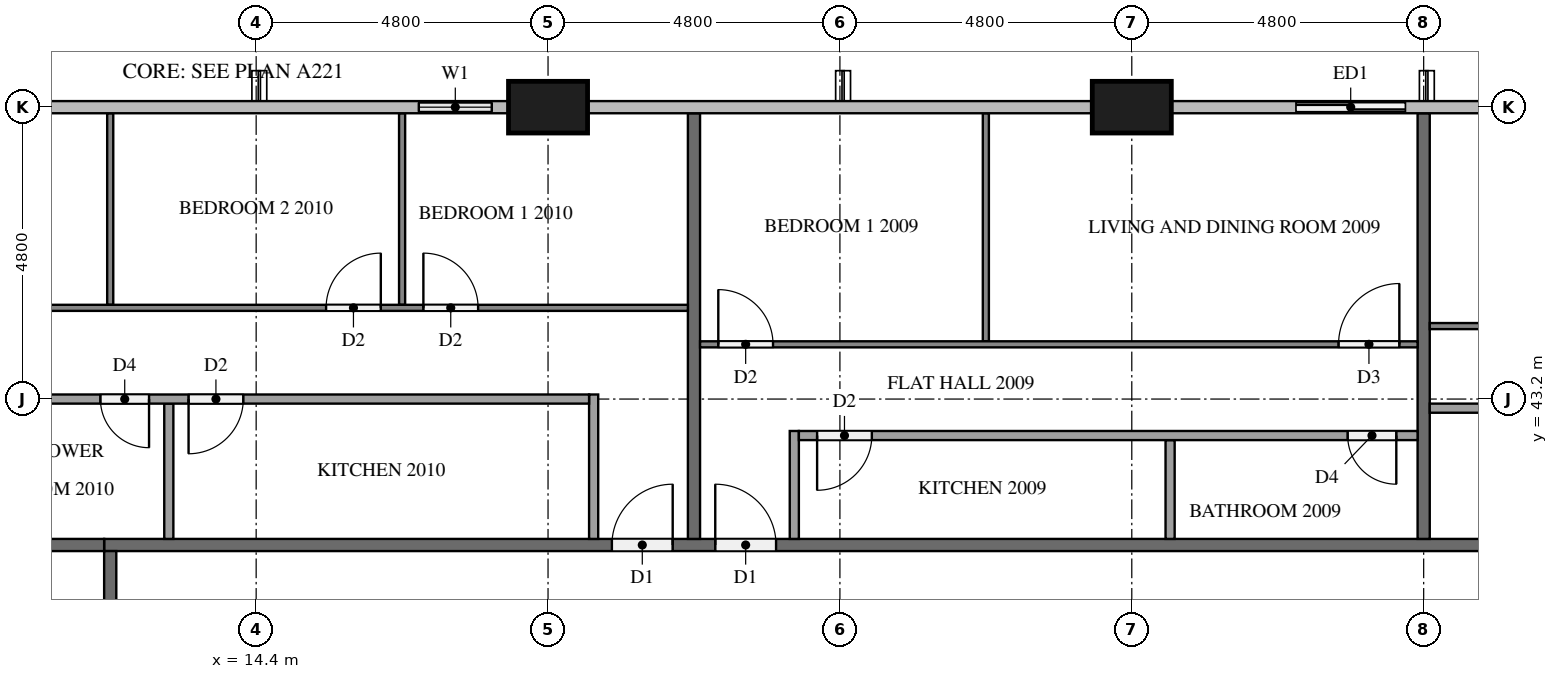
"""IFC4 building model, lengths in metres.
Left out: names, types, materials, properties, quantities, classifications, styles, units other than length and angle.
Written with IfcOpenShell. Run it as: python <this file> out.ifc"""

import sys

from ifc_helpers import new_model, si_unit, direction, frame, frame_2d, origin, origin_2d, place, context, subcontext, project, spatial, rectangle, extrude, element, fill, save


model = new_model("IFC4")
c1 = context("Model", 3, precision=1e-05, world=origin(), true_north=direction((0.0, 1.0)))
c2 = subcontext(c1, "Body", "Model", "MODEL_VIEW")
j1 = project(units=[si_unit("LENGTHUNIT", "METRE"), si_unit("PLANEANGLEUNIT", "RADIAN")], contexts=[c1])
p1 = place(None, origin())
s1 = spatial("IfcSite", under=j1, at=p1, CompositionType="ELEMENT")
p2 = place(p1, origin())
s2 = spatial("IfcBuilding", under=s1, at=p2, CompositionType="ELEMENT")
p3 = place(p2, frame((0.0, 0.0, 80.3)))
s3 = spatial("IfcBuildingStorey", under=s2, at=p3, CompositionType="ELEMENT", Elevation=80.3)
for number, where, z_axis, x_axis in (
    (1, (28.8, 48.0, 0.0), (0.0, 0.0, 1.0), (1.0, 0.0, 0.0)),
    (2, (19.2, 48.0, 0.0), (0.0, 0.0, 1.0), (1.0, 0.0, 0.0)),
):
    element("IfcColumn", number, at=place(p3, frame(where, z_axis=z_axis, x_axis=x_axis)), inside=s3, PredefinedType="COLUMN", context=c2, shape_type="SweptSolid", body=[
        extrude(rectangle(XDim=1.3, YDim=0.85, at=origin_2d()), origin(), (0.0, 0.0, 1.0), 3.1),
    ])
p4 = place(p3, frame((33.6, 48.0, 0.0), z_axis=(0.0, 0.0, 1.0), x_axis=(-1.0, 0.0, 0.0)))
e3 = element("IfcWall", 3, at=p4, inside=s3, PredefinedType="SOLIDWALL", context=c2, shape_type="SweptSolid", body=[
    extrude(rectangle(XDim=2.4, YDim=0.15, at=frame_2d((1.2, 0.0))), origin(), (0.0, 0.0, 1.0), 3.1),
])
p5 = place(p4, frame((0.3, 0.0, 0.0)))
e4 = element("IfcOpeningElement", 4, at=p5, cuts=e3, PredefinedType="OPENING", context=c2, shape_type="SweptSolid", body=[
    extrude(rectangle(XDim=1.8, YDim=2.4, at=frame_2d((0.9, 1.2))), frame((0.0, 0.085, 0.0), z_axis=(0.0, -1.0, 0.0), x_axis=(1.0, 0.0, 0.0)), (0.0, 0.0, 1.0), 0.17),
])
p6 = place(p3, frame((18.55, 48.0, 0.0), z_axis=(0.0, 0.0, 1.0), x_axis=(-1.0, 0.0, 0.0)))
e5 = element("IfcWall", 5, at=p6, inside=s3, PredefinedType="SOLIDWALL", context=c2, shape_type="SweptSolid", body=[
    extrude(rectangle(XDim=1.75, YDim=0.15, at=frame_2d((0.875, 0.0))), origin(), (0.0, 0.0, 1.0), 3.1),
])
p7 = place(p6, frame((0.275, 0.0, 0.9)))
e6 = element("IfcOpeningElement", 6, at=p7, cuts=e5, PredefinedType="OPENING", context=c2, shape_type="SweptSolid", body=[
    extrude(rectangle(XDim=1.2, YDim=1.4, at=frame_2d((0.6, 0.7))), frame((0.0, 0.085, 0.0), z_axis=(0.0, -1.0, 0.0), x_axis=(1.0, 0.0, 0.0)), (0.0, 0.0, 1.0), 0.17),
])
p8 = place(p3, frame((11.9, 40.8, 0.0), z_axis=(0.0, 0.0, 1.0), x_axis=(1.0, 0.0, 0.0)))
e7 = element("IfcWall", 7, at=p8, inside=s3, PredefinedType="PARTITIONING", context=c2, shape_type="SweptSolid", body=[
    extrude(rectangle(XDim=38.6, YDim=0.2, at=frame_2d((19.3, 0.0))), origin(), (0.0, 0.0, 1.0), 3.1),
])
p9 = place(p8, frame((37.15, 0.0, 0.0)))
e8 = element("IfcOpeningElement", 8, at=p9, cuts=e7, PredefinedType="OPENING", context=c2, shape_type="SweptSolid", body=[
    extrude(rectangle(XDim=1.0, YDim=2.1, at=frame_2d((0.5, 1.05))), frame((0.0, 0.11, 0.0), z_axis=(0.0, -1.0, 0.0), x_axis=(1.0, 0.0, 0.0)), (0.0, 0.0, 1.0), 0.22),
])
p10 = place(p8, frame((10.05, 0.0, 0.0)))
e9 = element("IfcOpeningElement", 9, at=p10, cuts=e7, PredefinedType="OPENING", context=c2, shape_type="SweptSolid", body=[
    extrude(rectangle(XDim=1.0, YDim=2.1, at=frame_2d((0.5, 1.05))), frame((0.0, 0.11, 0.0), z_axis=(0.0, -1.0, 0.0), x_axis=(1.0, 0.0, 0.0)), (0.0, 0.0, 1.0), 0.22),
])
p11 = place(p8, frame((8.35, 0.0, 0.0)))
e10 = element("IfcOpeningElement", 10, at=p11, cuts=e7, PredefinedType="OPENING", context=c2, shape_type="SweptSolid", body=[
    extrude(rectangle(XDim=1.0, YDim=2.1, at=frame_2d((0.5, 1.05))), frame((0.0, 0.11, 0.0), z_axis=(0.0, -1.0, 0.0), x_axis=(1.0, 0.0, 0.0)), (0.0, 0.0, 1.0), 0.22),
])
p12 = place(p3, frame((12.0, 12.1, 0.0), z_axis=(0.0, 0.0, 1.0), x_axis=(0.0, 1.0, 0.0)))
e11 = element("IfcWall", 11, at=p12, inside=s3, PredefinedType="PARTITIONING", context=c2, shape_type="SweptSolid", body=[
    extrude(rectangle(XDim=28.6, YDim=0.2, at=frame_2d((14.3, 0.0))), origin(), (0.0, 0.0, 1.0), 3.1),
])
p13 = place(p12, frame((17.05, 0.0, 0.0)))
e12 = element("IfcOpeningElement", 12, at=p13, cuts=e11, PredefinedType="OPENING", context=c2, shape_type="SweptSolid", body=[
    extrude(rectangle(XDim=1.0, YDim=2.1, at=frame_2d((0.5, 1.05))), frame((0.0, 0.11, 0.0), z_axis=(0.0, -1.0, 0.0), x_axis=(1.0, 0.0, 0.0)), (0.0, 0.0, 1.0), 0.22),
])
p14 = place(p12, frame((15.35, 0.0, 0.0)))
e13 = element("IfcOpeningElement", 13, at=p14, cuts=e11, PredefinedType="OPENING", context=c2, shape_type="SweptSolid", body=[
    extrude(rectangle(XDim=1.0, YDim=2.1, at=frame_2d((0.5, 1.05))), frame((0.0, 0.11, 0.0), z_axis=(0.0, -1.0, 0.0), x_axis=(1.0, 0.0, 0.0)), (0.0, 0.0, 1.0), 0.22),
])
p15 = place(p12, frame((8.15, 0.0, 0.0)))
e14 = element("IfcOpeningElement", 14, at=p15, cuts=e11, PredefinedType="OPENING", context=c2, shape_type="SweptSolid", body=[
    extrude(rectangle(XDim=1.0, YDim=2.1, at=frame_2d((0.5, 1.05))), frame((0.0, 0.11, 0.0), z_axis=(0.0, -1.0, 0.0), x_axis=(1.0, 0.0, 0.0)), (0.0, 0.0, 1.0), 0.22),
])
for number, where, z_axis, x_axis in (
    (15, (33.6, 47.9, 0.0), (0.0, 0.0, 1.0), (0.0, -1.0, 0.0)),
    (16, (21.6, 47.9, 0.0), (0.0, 0.0, 1.0), (0.0, -1.0, 0.0)),
    (17, (4.9, 40.8, 0.0), (0.0, 0.0, 1.0), (1.0, 0.0, 0.0)),
):
    element("IfcWall", number, at=place(p3, frame(where, z_axis=z_axis, x_axis=x_axis)), inside=s3, PredefinedType="PARTITIONING", context=c2, shape_type="SweptSolid", body=[
        extrude(rectangle(XDim=7.0, YDim=0.2, at=frame_2d((3.5, 0.0))), origin(), (0.0, 0.0, 1.0), 3.1),
    ])
p16 = place(p3, frame((33.7, 44.4, 0.0), z_axis=(0.0, 0.0, 1.0), x_axis=(1.0, 0.0, 0.0)))
e18 = element("IfcWall", 18, at=p16, inside=s3, PredefinedType="PARTITIONING", context=c2, shape_type="SweptSolid", body=[
    extrude(rectangle(XDim=16.6, YDim=0.1, at=frame_2d((8.3, 0.0))), origin(), (0.0, 0.0, 1.0), 3.1),
])
p17 = place(p16, frame((15.3, 0.0, 0.0)))
e19 = element("IfcOpeningElement", 19, at=p17, cuts=e18, PredefinedType="OPENING", context=c2, shape_type="SweptSolid", body=[
    extrude(rectangle(XDim=1.0, YDim=2.1, at=frame_2d((0.5, 1.05))), frame((0.0, 0.06, 0.0), z_axis=(0.0, -1.0, 0.0), x_axis=(1.0, 0.0, 0.0)), (0.0, 0.0, 1.0), 0.12),
])
p18 = place(p16, frame((5.05, 0.0, 0.0)))
e20 = element("IfcOpeningElement", 20, at=p18, cuts=e18, PredefinedType="OPENING", context=c2, shape_type="SweptSolid", body=[
    extrude(rectangle(XDim=0.9, YDim=2.1, at=frame_2d((0.45, 1.05))), frame((0.0, 0.06, 0.0), z_axis=(0.0, -1.0, 0.0), x_axis=(1.0, 0.0, 0.0)), (0.0, 0.0, 1.0), 0.12),
])
p19 = place(p16, frame((3.45, 0.0, 0.0)))
e21 = element("IfcOpeningElement", 21, at=p19, cuts=e18, PredefinedType="OPENING", context=c2, shape_type="SweptSolid", body=[
    extrude(rectangle(XDim=0.9, YDim=2.1, at=frame_2d((0.45, 1.05))), frame((0.0, 0.06, 0.0), z_axis=(0.0, -1.0, 0.0), x_axis=(1.0, 0.0, 0.0)), (0.0, 0.0, 1.0), 0.12),
])
p20 = place(p3, frame((48.675, 43.05, 0.0), z_axis=(0.0, 0.0, 1.0), x_axis=(-1.0, 0.0, 0.0)))
e22 = element("IfcWall", 22, at=p20, inside=s3, PredefinedType="PARTITIONING", context=c2, shape_type="SweptSolid", body=[
    extrude(rectangle(XDim=14.975, YDim=0.15, at=frame_2d((7.488, 0.0))), origin(), (0.0, 0.0, 1.0), 3.1),
])
p21 = place(p20, frame((0.3, 0.0, 0.0)))
e23 = element("IfcOpeningElement", 23, at=p21, cuts=e22, PredefinedType="OPENING", context=c2, shape_type="SweptSolid", body=[
    extrude(rectangle(XDim=0.9, YDim=2.1, at=frame_2d((0.45, 1.05))), frame((0.0, 0.085, 0.0), z_axis=(0.0, -1.0, 0.0), x_axis=(1.0, 0.0, 0.0)), (0.0, 0.0, 1.0), 0.17),
])
p22 = place(p20, frame((9.242, 0.0, 0.0)))
e24 = element("IfcOpeningElement", 24, at=p22, cuts=e22, PredefinedType="OPENING", context=c2, shape_type="SweptSolid", body=[
    extrude(rectangle(XDim=0.8, YDim=2.1, at=frame_2d((0.4, 1.05))), frame((0.0, 0.085, 0.0), z_axis=(0.0, -1.0, 0.0), x_axis=(1.0, 0.0, 0.0)), (0.0, 0.0, 1.0), 0.17),
])
p23 = place(p20, frame((10.692, 0.0, 0.0)))
e25 = element("IfcOpeningElement", 25, at=p23, cuts=e22, PredefinedType="OPENING", context=c2, shape_type="SweptSolid", body=[
    extrude(rectangle(XDim=0.9, YDim=2.1, at=frame_2d((0.45, 1.05))), frame((0.0, 0.085, 0.0), z_axis=(0.0, -1.0, 0.0), x_axis=(1.0, 0.0, 0.0)), (0.0, 0.0, 1.0), 0.17),
])
p24 = place(p3, frame((26.4, 44.15, 0.0), z_axis=(0.0, 0.0, 1.0), x_axis=(0.0, 1.0, 0.0)))
e26 = element("IfcWall", 26, at=p24, inside=s3, PredefinedType="PARTITIONING", context=c2, shape_type="SweptSolid", body=[
    extrude(rectangle(XDim=3.75, YDim=0.1, at=frame_2d((1.875, 0.0))), origin(), (0.0, 0.0, 1.0), 3.1),
])
p25 = place(p3, frame((21.7, 44.1, 0.0), z_axis=(0.0, 0.0, 1.0), x_axis=(1.0, 0.0, 0.0)))
e27 = element("IfcWall", 27, at=p25, inside=s3, PredefinedType="PARTITIONING", context=c2, shape_type="SweptSolid", body=[
    extrude(rectangle(XDim=11.8, YDim=0.1, at=frame_2d((5.9, 0.0))), origin(), (0.0, 0.0, 1.0), 3.1),
])
p26 = place(p25, frame((0.3, 0.0, 0.0)))
e28 = element("IfcOpeningElement", 28, at=p26, cuts=e27, PredefinedType="OPENING", context=c2, shape_type="SweptSolid", body=[
    extrude(rectangle(XDim=0.9, YDim=2.1, at=frame_2d((0.45, 1.05))), frame((0.0, 0.06, 0.0), z_axis=(0.0, -1.0, 0.0), x_axis=(1.0, 0.0, 0.0)), (0.0, 0.0, 1.0), 0.12),
])
p27 = place(p25, frame((10.5, 0.0, 0.0)))
e29 = element("IfcOpeningElement", 29, at=p27, cuts=e27, PredefinedType="OPENING", context=c2, shape_type="SweptSolid", body=[
    extrude(rectangle(XDim=1.0, YDim=2.1, at=frame_2d((0.5, 1.05))), frame((0.0, 0.06, 0.0), z_axis=(0.0, -1.0, 0.0), x_axis=(1.0, 0.0, 0.0)), (0.0, 0.0, 1.0), 0.12),
])
p28 = place(p3, frame((29.43, 40.9, 0.0), z_axis=(0.0, 0.0, 1.0), x_axis=(0.0, 1.0, 0.0)))
e30 = element("IfcWall", 30, at=p28, inside=s3, PredefinedType="PARTITIONING", context=c2, shape_type="SweptSolid", body=[
    extrude(rectangle(XDim=1.625, YDim=0.15, at=frame_2d((0.812, 0.0))), origin(), (0.0, 0.0, 1.0), 3.1),
])
p29 = place(p3, frame((23.25, 40.9, 0.0), z_axis=(0.0, 0.0, 1.0), x_axis=(0.0, 1.0, 0.0)))
e31 = element("IfcWall", 31, at=p29, inside=s3, PredefinedType="PARTITIONING", context=c2, shape_type="SweptSolid", body=[
    extrude(rectangle(XDim=1.775, YDim=0.15, at=frame_2d((0.888, 0.0))), origin(), (0.0, 0.0, 1.0), 3.1),
])
p30 = place(p3, frame((33.5, 42.6, 0.0), z_axis=(0.0, 0.0, 1.0), x_axis=(-1.0, 0.0, 0.0)))
e32 = element("IfcWall", 32, at=p30, inside=s3, PredefinedType="PARTITIONING", context=c2, shape_type="SweptSolid", body=[
    extrude(rectangle(XDim=10.175, YDim=0.15, at=frame_2d((5.087, 0.0))), origin(), (0.0, 0.0, 1.0), 3.1),
])
p31 = place(p30, frame((8.975, 0.0, 0.0)))
e33 = element("IfcOpeningElement", 33, at=p31, cuts=e32, PredefinedType="OPENING", context=c2, shape_type="SweptSolid", body=[
    extrude(rectangle(XDim=0.9, YDim=2.1, at=frame_2d((0.45, 1.05))), frame((0.0, 0.085, 0.0), z_axis=(0.0, -1.0, 0.0), x_axis=(1.0, 0.0, 0.0)), (0.0, 0.0, 1.0), 0.17),
])
p32 = place(p30, frame((0.35, 0.0, 0.0)))
e34 = element("IfcOpeningElement", 34, at=p32, cuts=e32, PredefinedType="OPENING", context=c2, shape_type="SweptSolid", body=[
    extrude(rectangle(XDim=0.8, YDim=2.1, at=frame_2d((0.4, 1.05))), frame((0.0, 0.085, 0.0), z_axis=(0.0, -1.0, 0.0), x_axis=(1.0, 0.0, 0.0)), (0.0, 0.0, 1.0), 0.17),
])
for number, where, z_axis, x_axis in (
    (35, (16.8, 44.75, 0.0), (0.0, 0.0, 1.0), (0.0, 1.0, 0.0)),
    (36, (12.0, 44.75, 0.0), (0.0, 0.0, 1.0), (0.0, 1.0, 0.0)),
):
    element("IfcWall", number, at=place(p3, frame(where, z_axis=z_axis, x_axis=x_axis)), inside=s3, PredefinedType="PARTITIONING", context=c2, shape_type="SweptSolid", body=[
        extrude(rectangle(XDim=3.15, YDim=0.1, at=frame_2d((1.575, 0.0))), origin(), (0.0, 0.0, 1.0), 3.1),
    ])
p33 = place(p3, frame((5.302, 44.7, 0.0), z_axis=(0.0, 0.0, 1.0), x_axis=(1.0, 0.0, 0.0)))
e37 = element("IfcWall", 37, at=p33, inside=s3, PredefinedType="PARTITIONING", context=c2, shape_type="SweptSolid", body=[
    extrude(rectangle(XDim=16.198, YDim=0.1, at=frame_2d((8.099, 0.0))), origin(), (0.0, 0.0, 1.0), 3.1),
])
p34 = place(p33, frame((11.848, 0.0, 0.0)))
e38 = element("IfcOpeningElement", 38, at=p34, cuts=e37, PredefinedType="OPENING", context=c2, shape_type="SweptSolid", body=[
    extrude(rectangle(XDim=0.9, YDim=2.1, at=frame_2d((0.45, 1.05))), frame((0.0, 0.06, 0.0), z_axis=(0.0, -1.0, 0.0), x_axis=(1.0, 0.0, 0.0)), (0.0, 0.0, 1.0), 0.12),
])
p35 = place(p33, frame((10.248, 0.0, 0.0)))
e39 = element("IfcOpeningElement", 39, at=p35, cuts=e37, PredefinedType="OPENING", context=c2, shape_type="SweptSolid", body=[
    extrude(rectangle(XDim=0.9, YDim=2.1, at=frame_2d((0.45, 1.05))), frame((0.0, 0.06, 0.0), z_axis=(0.0, -1.0, 0.0), x_axis=(1.0, 0.0, 0.0)), (0.0, 0.0, 1.0), 0.12),
])
p36 = place(p33, frame((0.3, 0.0, 0.0)))
e40 = element("IfcOpeningElement", 40, at=p36, cuts=e37, PredefinedType="OPENING", context=c2, shape_type="SweptSolid", body=[
    extrude(rectangle(XDim=1.0, YDim=2.1, at=frame_2d((0.5, 1.05))), frame((0.0, 0.06, 0.0), z_axis=(0.0, -1.0, 0.0), x_axis=(1.0, 0.0, 0.0)), (0.0, 0.0, 1.0), 0.12),
])
p37 = place(p3, frame((12.963, 40.9, 0.0), z_axis=(0.0, 0.0, 1.0), x_axis=(0.0, 1.0, 0.0)))
e41 = element("IfcWall", 41, at=p37, inside=s3, PredefinedType="PARTITIONING", context=c2, shape_type="SweptSolid", body=[
    extrude(rectangle(XDim=2.225, YDim=0.15, at=frame_2d((1.113, 0.0))), origin(), (0.0, 0.0, 1.0), 3.1),
])
p38 = place(p3, frame((19.95, 40.9, 0.0), z_axis=(0.0, 0.0, 1.0), x_axis=(0.0, 1.0, 0.0)))
e42 = element("IfcWall", 42, at=p38, inside=s3, PredefinedType="PARTITIONING", context=c2, shape_type="SweptSolid", body=[
    extrude(rectangle(XDim=2.375, YDim=0.15, at=frame_2d((1.188, 0.0))), origin(), (0.0, 0.0, 1.0), 3.1),
])
p39 = place(p3, frame((19.875, 43.2, 0.0), z_axis=(0.0, 0.0, 1.0), x_axis=(-1.0, 0.0, 0.0)))
e43 = element("IfcWall", 43, at=p39, inside=s3, PredefinedType="PARTITIONING", context=c2, shape_type="SweptSolid", body=[
    extrude(rectangle(XDim=14.5, YDim=0.15, at=frame_2d((7.25, 0.0))), origin(), (0.0, 0.0, 1.0), 3.1),
])
p40 = place(p39, frame((5.687, 0.0, 0.0)))
e44 = element("IfcOpeningElement", 44, at=p40, cuts=e43, PredefinedType="OPENING", context=c2, shape_type="SweptSolid", body=[
    extrude(rectangle(XDim=0.9, YDim=2.1, at=frame_2d((0.45, 1.05))), frame((0.0, 0.085, 0.0), z_axis=(0.0, -1.0, 0.0), x_axis=(1.0, 0.0, 0.0)), (0.0, 0.0, 1.0), 0.17),
])
p41 = place(p39, frame((7.237, 0.0, 0.0)))
e45 = element("IfcOpeningElement", 45, at=p41, cuts=e43, PredefinedType="OPENING", context=c2, shape_type="SweptSolid", body=[
    extrude(rectangle(XDim=0.8, YDim=2.1, at=frame_2d((0.4, 1.05))), frame((0.0, 0.085, 0.0), z_axis=(0.0, -1.0, 0.0), x_axis=(1.0, 0.0, 0.0)), (0.0, 0.0, 1.0), 0.17),
])
p42 = place(p39, frame((13.3, 0.0, 0.0)))
e46 = element("IfcOpeningElement", 46, at=p42, cuts=e43, PredefinedType="OPENING", context=c2, shape_type="SweptSolid", body=[
    extrude(rectangle(XDim=0.9, YDim=2.1, at=frame_2d((0.45, 1.05))), frame((0.0, 0.085, 0.0), z_axis=(0.0, -1.0, 0.0), x_axis=(1.0, 0.0, 0.0)), (0.0, 0.0, 1.0), 0.17),
])
p43 = place(p5, origin())
e47 = element("IfcDoor", 47, at=p43, inside=s3, OperationType="SLIDING_TO_RIGHT", PredefinedType="DOOR", context=c2, shape_type="SweptSolid", body=[
    extrude(rectangle(XDim=1.8, YDim=2.4, at=frame_2d((0.9, 1.2))), frame((0.0, 0.025, 0.0), z_axis=(0.0, -1.0, 0.0), x_axis=(1.0, 0.0, 0.0)), (0.0, 0.0, 1.0), 0.05),
])
fill(e4, e47)
p44 = place(p7, origin())
e48 = element("IfcWindow", 48, at=p44, inside=s3, PartitioningType="SINGLE_PANEL", PredefinedType="WINDOW", context=c2, shape_type="SweptSolid", body=[
    extrude(rectangle(XDim=1.2, YDim=1.4, at=frame_2d((0.6, 0.7))), frame((0.0, 0.03, 0.0), z_axis=(0.0, -1.0, 0.0), x_axis=(1.0, 0.0, 0.0)), (0.0, 0.0, 1.0), 0.06),
])
fill(e6, e48)
p45 = place(p10, origin())
e49 = element("IfcDoor", 49, at=p45, inside=s3, OperationType="SINGLE_SWING_LEFT", PredefinedType="DOOR", context=c2, shape_type="SweptSolid", body=[
    extrude(rectangle(XDim=1.0, YDim=2.1, at=frame_2d((0.5, 1.05))), frame((0.0, 0.025, 0.0), z_axis=(0.0, -1.0, 0.0), x_axis=(1.0, 0.0, 0.0)), (0.0, 0.0, 1.0), 0.05),
])
fill(e9, e49)
p46 = place(p11, origin())
e50 = element("IfcDoor", 50, at=p46, inside=s3, OperationType="SINGLE_SWING_RIGHT", PredefinedType="DOOR", context=c2, shape_type="SweptSolid", body=[
    extrude(rectangle(XDim=1.0, YDim=2.1, at=frame_2d((0.5, 1.05))), frame((0.0, 0.025, 0.0), z_axis=(0.0, -1.0, 0.0), x_axis=(1.0, 0.0, 0.0)), (0.0, 0.0, 1.0), 0.05),
])
fill(e10, e50)
p47 = place(p26, origin())
e51 = element("IfcDoor", 51, at=p47, inside=s3, OperationType="SINGLE_SWING_LEFT", PredefinedType="DOOR", context=c2, shape_type="SweptSolid", body=[
    extrude(rectangle(XDim=0.9, YDim=2.1, at=frame_2d((0.45, 1.05))), frame((0.0, 0.025, 0.0), z_axis=(0.0, -1.0, 0.0), x_axis=(1.0, 0.0, 0.0)), (0.0, 0.0, 1.0), 0.05),
])
fill(e28, e51)
p48 = place(p27, origin())
e52 = element("IfcDoor", 52, at=p48, inside=s3, OperationType="SINGLE_SWING_RIGHT", PredefinedType="DOOR", context=c2, shape_type="SweptSolid", body=[
    extrude(rectangle(XDim=1.0, YDim=2.1, at=frame_2d((0.5, 1.05))), frame((0.0, 0.025, 0.0), z_axis=(0.0, -1.0, 0.0), x_axis=(1.0, 0.0, 0.0)), (0.0, 0.0, 1.0), 0.05),
])
fill(e29, e52)
p49 = place(p31, origin())
e53 = element("IfcDoor", 53, at=p49, inside=s3, OperationType="SINGLE_SWING_RIGHT", PredefinedType="DOOR", context=c2, shape_type="SweptSolid", body=[
    extrude(rectangle(XDim=0.9, YDim=2.1, at=frame_2d((0.45, 1.05))), frame((0.0, 0.025, 0.0), z_axis=(0.0, -1.0, 0.0), x_axis=(1.0, 0.0, 0.0)), (0.0, 0.0, 1.0), 0.05),
])
fill(e33, e53)
p50 = place(p32, origin())
e54 = element("IfcDoor", 54, at=p50, inside=s3, OperationType="SINGLE_SWING_LEFT", PredefinedType="DOOR", context=c2, shape_type="SweptSolid", body=[
    extrude(rectangle(XDim=0.8, YDim=2.1, at=frame_2d((0.4, 1.05))), frame((0.0, 0.025, 0.0), z_axis=(0.0, -1.0, 0.0), x_axis=(1.0, 0.0, 0.0)), (0.0, 0.0, 1.0), 0.05),
])
fill(e34, e54)
p51 = place(p34, origin())
e55 = element("IfcDoor", 55, at=p51, inside=s3, OperationType="SINGLE_SWING_LEFT", PredefinedType="DOOR", context=c2, shape_type="SweptSolid", body=[
    extrude(rectangle(XDim=0.9, YDim=2.1, at=frame_2d((0.45, 1.05))), frame((0.0, 0.025, 0.0), z_axis=(0.0, -1.0, 0.0), x_axis=(1.0, 0.0, 0.0)), (0.0, 0.0, 1.0), 0.05),
])
fill(e38, e55)
p52 = place(p35, origin())
e56 = element("IfcDoor", 56, at=p52, inside=s3, OperationType="SINGLE_SWING_RIGHT", PredefinedType="DOOR", context=c2, shape_type="SweptSolid", body=[
    extrude(rectangle(XDim=0.9, YDim=2.1, at=frame_2d((0.45, 1.05))), frame((0.0, 0.025, 0.0), z_axis=(0.0, -1.0, 0.0), x_axis=(1.0, 0.0, 0.0)), (0.0, 0.0, 1.0), 0.05),
])
fill(e39, e56)
p53 = place(p40, origin())
e57 = element("IfcDoor", 57, at=p53, inside=s3, OperationType="SINGLE_SWING_RIGHT", PredefinedType="DOOR", context=c2, shape_type="SweptSolid", body=[
    extrude(rectangle(XDim=0.9, YDim=2.1, at=frame_2d((0.45, 1.05))), frame((0.0, 0.025, 0.0), z_axis=(0.0, -1.0, 0.0), x_axis=(1.0, 0.0, 0.0)), (0.0, 0.0, 1.0), 0.05),
])
fill(e44, e57)
p54 = place(p41, origin())
e58 = element("IfcDoor", 58, at=p54, inside=s3, OperationType="SINGLE_SWING_LEFT", PredefinedType="DOOR", context=c2, shape_type="SweptSolid", body=[
    extrude(rectangle(XDim=0.8, YDim=2.1, at=frame_2d((0.4, 1.05))), frame((0.0, 0.025, 0.0), z_axis=(0.0, -1.0, 0.0), x_axis=(1.0, 0.0, 0.0)), (0.0, 0.0, 1.0), 0.05),
])
fill(e45, e58)
save(model, sys.argv[1])
